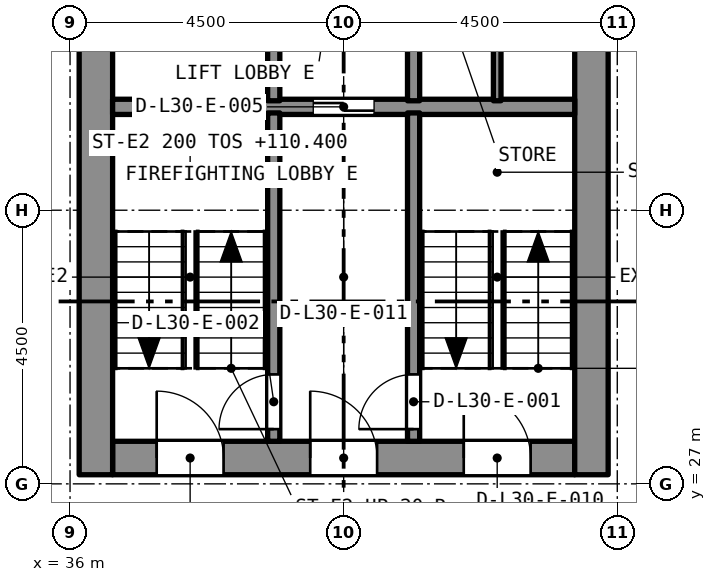
"""IFC4 building model, lengths in metres.
Left out: names, types, materials, properties, quantities, classifications, styles, units other than length and angle.
Written with IfcOpenShell. Run it as: python <this file> out.ifc"""

import sys

from ifc_helpers import new_model, si_unit, direction, frame, frame_2d, origin, place, context, subcontext, project, spatial, rectangle, extrude, element, fill, save


model = new_model("IFC4")
c1 = context("Model", 3, precision=1e-05, world=origin(), true_north=direction((0.0, 1.0)))
c2 = subcontext(c1, "Body", "Model", "MODEL_VIEW")
j1 = project(units=[si_unit("LENGTHUNIT", "METRE"), si_unit("PLANEANGLEUNIT", "RADIAN")], contexts=[c1])
p1 = place(None, origin())
s1 = spatial("IfcSite", under=j1, at=p1, CompositionType="ELEMENT")
p2 = place(p1, origin())
s2 = spatial("IfcBuilding", under=s1, at=p2, CompositionType="ELEMENT")
p3 = place(p2, frame((0.0, 0.0, 108.8)))
s3 = spatial("IfcBuildingStorey", under=s2, at=p3, CompositionType="ELEMENT", Elevation=108.8)
p4 = place(p3, frame((36.7, 27.425, 0.0), z_axis=(0.0, 0.0, 1.0), x_axis=(1.0, 0.0, 0.0)))
e1 = element("IfcWall", 1, at=p4, inside=s3, PredefinedType="SOLIDWALL", context=c2, shape_type="SweptSolid", body=[
    extrude(rectangle(XDim=7.6, YDim=0.55, at=frame_2d((3.8, 0.0))), origin(), (0.0, 0.0, 1.0), 3.2),
])
p5 = place(p4, frame((5.775, 0.0, 0.0)))
e2 = element("IfcOpeningElement", 2, at=p5, cuts=e1, PredefinedType="OPENING", context=c2, shape_type="SweptSolid", body=[
    extrude(rectangle(XDim=1.1, YDim=2.1, at=frame_2d((0.55, 1.05))), frame((0.0, 0.285, 0.0), z_axis=(0.0, -1.0, 0.0), x_axis=(1.0, 0.0, 0.0)), (0.0, 0.0, 1.0), 0.57),
])
p6 = place(p4, frame((3.25, 0.0, 0.0)))
e3 = element("IfcOpeningElement", 3, at=p6, cuts=e1, PredefinedType="OPENING", context=c2, shape_type="SweptSolid", body=[
    extrude(rectangle(XDim=1.1, YDim=2.1, at=frame_2d((0.55, 1.05))), frame((0.0, 0.285, 0.0), z_axis=(0.0, -1.0, 0.0), x_axis=(1.0, 0.0, 0.0)), (0.0, 0.0, 1.0), 0.57),
])
p7 = place(p4, frame((0.725, 0.0, 0.0)))
e4 = element("IfcOpeningElement", 4, at=p7, cuts=e1, PredefinedType="OPENING", context=c2, shape_type="SweptSolid", body=[
    extrude(rectangle(XDim=1.1, YDim=2.1, at=frame_2d((0.55, 1.05))), frame((0.0, 0.285, 0.0), z_axis=(0.0, -1.0, 0.0), x_axis=(1.0, 0.0, 0.0)), (0.0, 0.0, 1.0), 0.57),
])
p8 = place(p3, frame((36.425, 27.15, 0.0), z_axis=(0.0, 0.0, 1.0), x_axis=(0.0, 1.0, 0.0)))
e5 = element("IfcWall", 5, at=p8, inside=s3, PredefinedType="SOLIDWALL", context=c2, shape_type="SweptSolid", body=[
    extrude(rectangle(XDim=13.2, YDim=0.55, at=frame_2d((6.6, 0.0))), origin(), (0.0, 0.0, 1.0), 3.2),
])
p9 = place(p8, frame((8.8, 0.0, 0.0)))
e6 = element("IfcOpeningElement", 6, at=p9, cuts=e5, PredefinedType="OPENING", context=c2, shape_type="SweptSolid", body=[
    extrude(rectangle(XDim=1.2, YDim=2.1, at=frame_2d((0.6, 1.05))), frame((0.0, 0.285, 0.0), z_axis=(0.0, -1.0, 0.0), x_axis=(1.0, 0.0, 0.0)), (0.0, 0.0, 1.0), 0.57),
])
p10 = place(p3, frame((44.575, 27.15, 0.0), z_axis=(0.0, 0.0, 1.0), x_axis=(0.0, 1.0, 0.0)))
e7 = element("IfcWall", 7, at=p10, inside=s3, PredefinedType="SOLIDWALL", context=c2, shape_type="SweptSolid", body=[
    extrude(rectangle(XDim=13.2, YDim=0.55, at=frame_2d((6.6, 0.0))), origin(), (0.0, 0.0, 1.0), 3.2),
])
p11 = place(p10, frame((8.8, 0.0, 0.0)))
e8 = element("IfcOpeningElement", 8, at=p11, cuts=e7, PredefinedType="OPENING", context=c2, shape_type="SweptSolid", body=[
    extrude(rectangle(XDim=1.2, YDim=2.1, at=frame_2d((0.6, 1.05))), frame((0.0, 0.285, 0.0), z_axis=(0.0, -1.0, 0.0), x_axis=(1.0, 0.0, 0.0)), (0.0, 0.0, 1.0), 0.57),
])
p12 = place(p3, frame((36.7, 33.2, 0.0), z_axis=(0.0, 0.0, 1.0), x_axis=(1.0, 0.0, 0.0)))
e9 = element("IfcWall", 9, at=p12, inside=s3, PredefinedType="SOLIDWALL", context=c2, shape_type="SweptSolid", body=[
    extrude(rectangle(XDim=7.6, YDim=0.25, at=frame_2d((3.8, 0.0))), origin(), (0.0, 0.0, 1.0), 2.9),
])
p13 = place(p12, frame((3.3, 0.0, 0.0)))
e10 = element("IfcOpeningElement", 10, at=p13, cuts=e9, PredefinedType="OPENING", context=c2, shape_type="SweptSolid", body=[
    extrude(rectangle(XDim=1.0, YDim=2.1, at=frame_2d((0.5, 1.05))), frame((0.0, 0.135, 0.0), z_axis=(0.0, -1.0, 0.0), x_axis=(1.0, 0.0, 0.0)), (0.0, 0.0, 1.0), 0.27),
])
p14 = place(p3, frame((41.65, 27.7, 0.0), z_axis=(0.0, 0.0, 1.0), x_axis=(0.0, 1.0, 0.0)))
e11 = element("IfcWall", 11, at=p14, inside=s3, PredefinedType="SOLIDWALL", context=c2, shape_type="SweptSolid", body=[
    extrude(rectangle(XDim=5.4, YDim=0.2, at=frame_2d((2.7, 0.0))), origin(), (0.0, 0.0, 1.0), 2.9),
])
p15 = place(p14, frame((0.2, 0.0, 0.0)))
e12 = element("IfcOpeningElement", 12, at=p15, cuts=e11, PredefinedType="OPENING", context=c2, shape_type="SweptSolid", body=[
    extrude(rectangle(XDim=0.9, YDim=2.1, at=frame_2d((0.45, 1.05))), frame((0.0, 0.11, 0.0), z_axis=(0.0, -1.0, 0.0), x_axis=(1.0, 0.0, 0.0)), (0.0, 0.0, 1.0), 0.22),
])
p16 = place(p3, frame((39.35, 27.7, 0.0), z_axis=(0.0, 0.0, 1.0), x_axis=(0.0, 1.0, 0.0)))
e13 = element("IfcWall", 13, at=p16, inside=s3, PredefinedType="SOLIDWALL", context=c2, shape_type="SweptSolid", body=[
    extrude(rectangle(XDim=5.4, YDim=0.2, at=frame_2d((2.7, 0.0))), origin(), (0.0, 0.0, 1.0), 2.9),
])
p17 = place(p16, frame((0.2, 0.0, 0.0)))
e14 = element("IfcOpeningElement", 14, at=p17, cuts=e13, PredefinedType="OPENING", context=c2, shape_type="SweptSolid", body=[
    extrude(rectangle(XDim=0.9, YDim=2.1, at=frame_2d((0.45, 1.05))), frame((0.0, 0.11, 0.0), z_axis=(0.0, -1.0, 0.0), x_axis=(1.0, 0.0, 0.0)), (0.0, 0.0, 1.0), 0.22),
])
for number, where, z_axis, x_axis in (
    (15, (41.65, 33.3, 0.0), (0.0, 0.0, 1.0), (0.0, 1.0, 0.0)),
    (16, (39.35, 33.3, 0.0), (0.0, 0.0, 1.0), (0.0, 1.0, 0.0)),
):
    element("IfcWall", number, at=place(p3, frame(where, z_axis=z_axis, x_axis=x_axis)), inside=s3, PredefinedType="SOLIDWALL", context=c2, shape_type="SweptSolid", body=[
        extrude(rectangle(XDim=2.3, YDim=0.2, at=frame_2d((1.15, 0.0))), origin(), (0.0, 0.0, 1.0), 2.9),
    ])
p18 = place(p3, frame((43.025, 33.3, 0.0), z_axis=(0.0, 0.0, 1.0), x_axis=(0.0, 1.0, 0.0)))
e17 = element("IfcWall", 17, at=p18, inside=s3, PredefinedType="PARTITIONING", context=c2, shape_type="SweptSolid", body=[
    extrude(rectangle(XDim=2.3, YDim=0.125, at=frame_2d((1.15, 0.0))), origin(), (0.0, 0.0, 1.0), 2.9),
])
p19 = place(p15, origin())
e18 = element("IfcDoor", 18, at=p19, inside=s3, OperationType="SINGLE_SWING_LEFT", PredefinedType="DOOR", context=c2, shape_type="SweptSolid", body=[
    extrude(rectangle(XDim=0.9, YDim=2.1, at=frame_2d((0.45, 1.05))), frame((0.0, 0.025, 0.0), z_axis=(0.0, -1.0, 0.0), x_axis=(1.0, 0.0, 0.0)), (0.0, 0.0, 1.0), 0.05),
])
fill(e12, e18)
p20 = place(p17, origin())
e19 = element("IfcDoor", 19, at=p20, inside=s3, OperationType="SINGLE_SWING_LEFT", PredefinedType="DOOR", context=c2, shape_type="SweptSolid", body=[
    extrude(rectangle(XDim=0.9, YDim=2.1, at=frame_2d((0.45, 1.05))), frame((0.0, 0.025, 0.0), z_axis=(0.0, -1.0, 0.0), x_axis=(1.0, 0.0, 0.0)), (0.0, 0.0, 1.0), 0.05),
])
fill(e14, e19)
p21 = place(p13, origin())
e20 = element("IfcDoor", 20, at=p21, inside=s3, OperationType="SLIDING_TO_LEFT", PredefinedType="DOOR", context=c2, shape_type="SweptSolid", body=[
    extrude(rectangle(XDim=1.0, YDim=2.1, at=frame_2d((0.5, 1.05))), frame((0.0, 0.025, 0.0), z_axis=(0.0, -1.0, 0.0), x_axis=(1.0, 0.0, 0.0)), (0.0, 0.0, 1.0), 0.05),
])
fill(e10, e20)
p22 = place(p5, origin())
e21 = element("IfcDoor", 21, at=p22, inside=s3, OperationType="SINGLE_SWING_LEFT", PredefinedType="DOOR", context=c2, shape_type="SweptSolid", body=[
    extrude(rectangle(XDim=1.1, YDim=2.1, at=frame_2d((0.55, 1.05))), frame((0.0, 0.025, 0.0), z_axis=(0.0, -1.0, 0.0), x_axis=(1.0, 0.0, 0.0)), (0.0, 0.0, 1.0), 0.05),
])
fill(e2, e21)
p23 = place(p6, origin())
e22 = element("IfcDoor", 22, at=p23, inside=s3, OperationType="SINGLE_SWING_LEFT", PredefinedType="DOOR", context=c2, shape_type="SweptSolid", body=[
    extrude(rectangle(XDim=1.1, YDim=2.1, at=frame_2d((0.55, 1.05))), frame((0.0, 0.025, 0.0), z_axis=(0.0, -1.0, 0.0), x_axis=(1.0, 0.0, 0.0)), (0.0, 0.0, 1.0), 0.05),
])
fill(e3, e22)
p24 = place(p7, origin())
e23 = element("IfcDoor", 23, at=p24, inside=s3, OperationType="SINGLE_SWING_LEFT", PredefinedType="DOOR", context=c2, shape_type="SweptSolid", body=[
    extrude(rectangle(XDim=1.1, YDim=2.1, at=frame_2d((0.55, 1.05))), frame((0.0, 0.025, 0.0), z_axis=(0.0, -1.0, 0.0), x_axis=(1.0, 0.0, 0.0)), (0.0, 0.0, 1.0), 0.05),
])
fill(e4, e23)
save(model, sys.argv[1])
